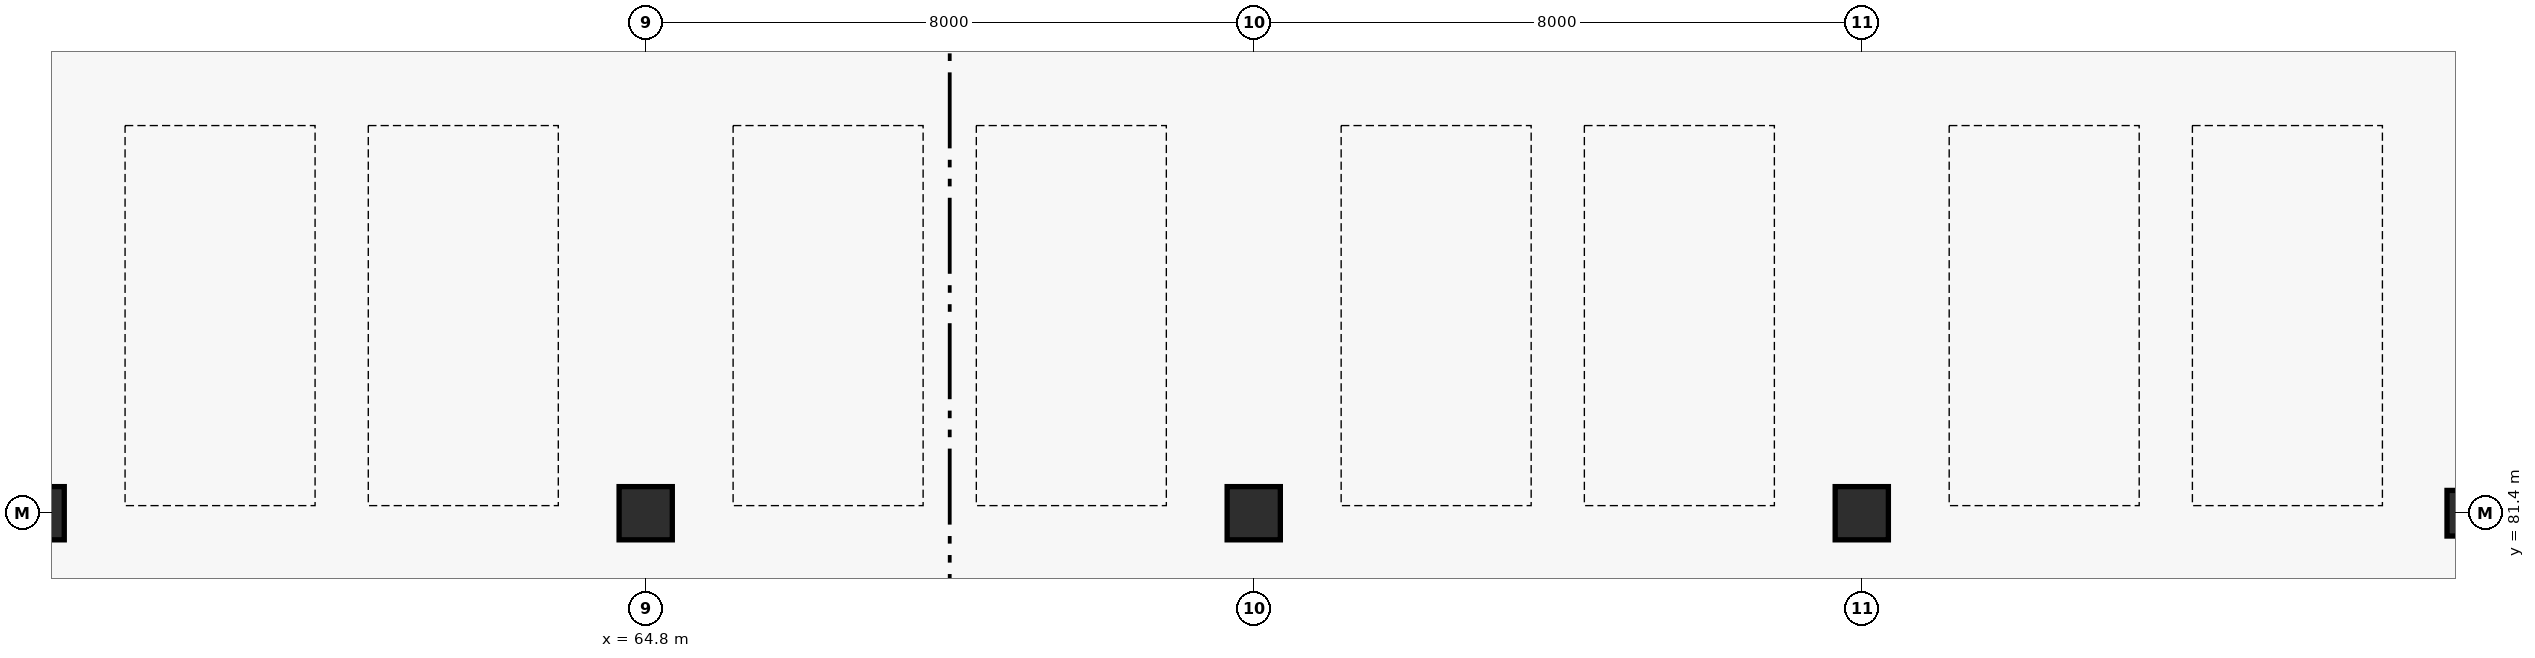
"""IFC4 building model, lengths in metres.
Left out: names, types, materials, properties, quantities, classifications, styles, units other than length and angle.
Written with IfcOpenShell. Run it as: python <this file> out.ifc"""

import sys

from ifc_helpers import new_model, si_unit, direction, frame, origin, origin_2d, place, context, subcontext, project, spatial, rectangle, circle, extrude, element, save


model = new_model("IFC4")
c1 = context("Model", 3, precision=1e-05, world=origin(), true_north=direction((0.0, 1.0)))
c2 = subcontext(c1, "Body", "Model", "MODEL_VIEW")
j1 = project(units=[si_unit("LENGTHUNIT", "METRE"), si_unit("PLANEANGLEUNIT", "RADIAN")], contexts=[c1])
p1 = place(None, origin())
s1 = spatial("IfcSite", under=j1, at=p1, CompositionType="ELEMENT")
p2 = place(p1, origin())
s2 = spatial("IfcBuilding", under=s1, at=p2, CompositionType="ELEMENT")
p3 = place(p2, frame((0.0, 0.0, -4.8)))
s3 = spatial("IfcBuildingStorey", under=s2, at=p3, CompositionType="ELEMENT", Elevation=-4.8)
for number, where, z_axis, x_axis in (
    (1, (56.8, 81.4, 0.0), (0.0, 0.0, 1.0), (1.0, 0.0, 0.0)),
    (2, (64.8, 81.4, 0.0), (0.0, 0.0, 1.0), (1.0, 0.0, 0.0)),
    (3, (72.8, 81.4, 0.0), (0.0, 0.0, 1.0), (1.0, 0.0, 0.0)),
    (4, (80.8, 81.4, 0.0), (0.0, 0.0, 1.0), (1.0, 0.0, 0.0)),
):
    element("IfcColumn", number, at=place(p3, frame(where, z_axis=z_axis, x_axis=x_axis)), inside=s3, PredefinedType="COLUMN", context=c2, shape_type="SweptSolid", body=[
        extrude(circle(Radius=0.35, at=origin_2d()), origin(), (0.0, 0.0, 1.0), 4.8),
    ])
p4 = place(p3, frame((88.8, 81.4, 0.0), z_axis=(0.0, 0.0, 1.0), x_axis=(1.0, 0.0, 0.0)))
e5 = element("IfcColumn", 5, at=p4, inside=s3, PredefinedType="COLUMN", context=c2, shape_type="SweptSolid", body=[
    extrude(rectangle(XDim=0.6, YDim=0.6, at=origin_2d()), origin(), (0.0, 0.0, 1.0), 4.8),
])
save(model, sys.argv[1])
